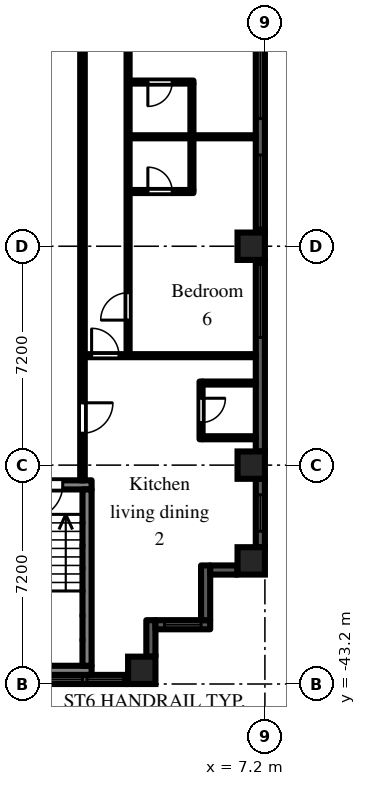
"""IFC4 building model, lengths in metres.
Left out: names, types, materials, properties, quantities, classifications, styles, units other than length and angle.
Written with IfcOpenShell. Run it as: python <this file> out.ifc"""

import sys

from ifc_helpers import new_model, si_unit, direction, frame, frame_2d, origin, origin_2d, place, context, subcontext, project, spatial, rectangle, extrude, element, fill, save


model = new_model("IFC4")
c1 = context("Model", 3, precision=1e-05, world=origin(), true_north=direction((0.0, 1.0)))
c2 = subcontext(c1, "Body", "Model", "MODEL_VIEW")
j1 = project(units=[si_unit("LENGTHUNIT", "METRE"), si_unit("PLANEANGLEUNIT", "RADIAN")], contexts=[c1])
p1 = place(None, origin())
s1 = spatial("IfcSite", under=j1, at=p1, CompositionType="ELEMENT")
p2 = place(p1, origin())
s2 = spatial("IfcBuilding", under=s1, at=p2, CompositionType="ELEMENT")
p3 = place(p2, frame((0.0, 0.0, 59.7)))
s3 = spatial("IfcBuildingStorey", under=s2, at=p3, CompositionType="ELEMENT", Elevation=59.7)
for number, where, z_axis, x_axis in (
    (1, (3.15, -42.75, 0.0), (0.0, 0.0, 1.0), (1.0, 0.0, 0.0)),
    (2, (6.75, -39.15, 0.0), (0.0, 0.0, 1.0), (1.0, 0.0, 0.0)),
    (3, (6.75, -36.0, 0.0), (0.0, 0.0, 1.0), (1.0, 0.0, 0.0)),
    (4, (6.75, -28.8, 0.0), (0.0, 0.0, 1.0), (1.0, 0.0, 0.0)),
):
    element("IfcColumn", number, at=place(p3, frame(where, z_axis=z_axis, x_axis=x_axis)), inside=s3, PredefinedType="COLUMN", context=c2, shape_type="SweptSolid", body=[
        extrude(rectangle(XDim=0.9, YDim=0.9, at=origin_2d()), origin(), (0.0, 0.0, 1.0), 3.0),
    ])
p4 = place(p3, frame((-2.7, -43.05, 0.0), z_axis=(0.0, 0.0, 1.0), x_axis=(1.0, 0.0, 0.0)))
e5 = element("IfcWall", 5, at=p4, inside=s3, PredefinedType="SOLIDWALL", context=c2, shape_type="SweptSolid", body=[
    extrude(rectangle(XDim=5.4, YDim=0.3, at=frame_2d((2.7, 0.0))), origin(), (0.0, 0.0, 1.0), 2.1),
])
p5 = place(p4, frame((1.5, 0.0, 0.2)))
e6 = element("IfcOpeningElement", 6, at=p5, cuts=e5, PredefinedType="OPENING", context=c2, shape_type="SweptSolid", body=[
    extrude(rectangle(XDim=2.4, YDim=1.85, at=frame_2d((1.2, 0.925))), frame((0.0, 0.16, 0.0), z_axis=(0.0, -1.0, 0.0), x_axis=(1.0, 0.0, 0.0)), (0.0, 0.0, 1.0), 0.32),
])
p6 = place(p4, frame((0.15, 0.0, 0.2)))
e7 = element("IfcOpeningElement", 7, at=p6, cuts=e5, PredefinedType="OPENING", context=c2, shape_type="SweptSolid", body=[
    extrude(rectangle(XDim=1.2, YDim=1.85, at=frame_2d((0.6, 0.925))), frame((0.0, 0.16, 0.0), z_axis=(0.0, -1.0, 0.0), x_axis=(1.0, 0.0, 0.0)), (0.0, 0.0, 1.0), 0.32),
])
p7 = place(p4, frame((4.05, 0.0, 0.2)))
e8 = element("IfcOpeningElement", 8, at=p7, cuts=e5, PredefinedType="OPENING", context=c2, shape_type="SweptSolid", body=[
    extrude(rectangle(XDim=1.2, YDim=1.85, at=frame_2d((0.6, 0.925))), frame((0.0, 0.16, 0.0), z_axis=(0.0, -1.0, 0.0), x_axis=(1.0, 0.0, 0.0)), (0.0, 0.0, 1.0), 0.32),
])
p8 = place(p3, frame((3.45, -42.3, 0.0), z_axis=(0.0, 0.0, 1.0), x_axis=(0.0, 1.0, 0.0)))
e9 = element("IfcWall", 9, at=p8, inside=s3, PredefinedType="SOLIDWALL", context=c2, shape_type="SweptSolid", body=[
    extrude(rectangle(XDim=1.2, YDim=0.3, at=frame_2d((0.6, 0.0))), origin(), (0.0, 0.0, 1.0), 2.55),
])
p9 = place(p3, frame((3.6, -41.25, 0.0), z_axis=(0.0, 0.0, 1.0), x_axis=(1.0, 0.0, 0.0)))
e10 = element("IfcWall", 10, at=p9, inside=s3, PredefinedType="SOLIDWALL", context=c2, shape_type="SweptSolid", body=[
    extrude(rectangle(XDim=1.8, YDim=0.3, at=frame_2d((0.9, 0.0))), origin(), (0.0, 0.0, 1.0), 2.55),
])
p10 = place(p9, frame((0.3, 0.0, 0.2)))
e11 = element("IfcOpeningElement", 11, at=p10, cuts=e10, PredefinedType="OPENING", context=c2, shape_type="SweptSolid", body=[
    extrude(rectangle(XDim=1.2, YDim=1.85, at=frame_2d((0.6, 0.925))), frame((0.0, 0.16, 0.0), z_axis=(0.0, -1.0, 0.0), x_axis=(1.0, 0.0, 0.0)), (0.0, 0.0, 1.0), 0.32),
])
p11 = place(p3, frame((5.25, -41.1, 0.0), z_axis=(0.0, 0.0, 1.0), x_axis=(0.0, 1.0, 0.0)))
e12 = element("IfcWall", 12, at=p11, inside=s3, PredefinedType="SOLIDWALL", context=c2, shape_type="SweptSolid", body=[
    extrude(rectangle(XDim=1.8, YDim=0.3, at=frame_2d((0.9, 0.0))), origin(), (0.0, 0.0, 1.0), 2.55),
])
p12 = place(p3, frame((5.4, -39.45, 0.0), z_axis=(0.0, 0.0, 1.0), x_axis=(1.0, 0.0, 0.0)))
e13 = element("IfcWall", 13, at=p12, inside=s3, PredefinedType="SOLIDWALL", context=c2, shape_type="SweptSolid", body=[
    extrude(rectangle(XDim=0.9, YDim=0.3, at=frame_2d((0.45, 0.0))), origin(), (0.0, 0.0, 1.0), 2.55),
])
p13 = place(p3, frame((7.05, -38.7, 0.0), z_axis=(0.0, 0.0, 1.0), x_axis=(0.0, 1.0, 0.0)))
e14 = element("IfcWall", 14, at=p13, inside=s3, PredefinedType="SOLIDWALL", context=c2, shape_type="SweptSolid", body=[
    extrude(rectangle(XDim=2.25, YDim=0.3, at=frame_2d((1.125, 0.0))), origin(), (0.0, 0.0, 1.0), 2.1),
])
p14 = place(p13, frame((0.525, 0.0, 0.2)))
e15 = element("IfcOpeningElement", 15, at=p14, cuts=e14, PredefinedType="OPENING", context=c2, shape_type="SweptSolid", body=[
    extrude(rectangle(XDim=1.2, YDim=1.85, at=frame_2d((0.6, 0.925))), frame((0.0, 0.16, 0.0), z_axis=(0.0, -1.0, 0.0), x_axis=(1.0, 0.0, 0.0)), (0.0, 0.0, 1.0), 0.32),
])
p15 = place(p3, frame((7.05, -35.55, 0.0), z_axis=(0.0, 0.0, 1.0), x_axis=(0.0, 1.0, 0.0)))
e16 = element("IfcWall", 16, at=p15, inside=s3, PredefinedType="SOLIDWALL", context=c2, shape_type="SweptSolid", body=[
    extrude(rectangle(XDim=6.3, YDim=0.3, at=frame_2d((3.15, 0.0))), origin(), (0.0, 0.0, 1.0), 2.1),
])
p16 = place(p15, frame((3.75, 0.0, 0.2)))
e17 = element("IfcOpeningElement", 17, at=p16, cuts=e16, PredefinedType="OPENING", context=c2, shape_type="SweptSolid", body=[
    extrude(rectangle(XDim=2.4, YDim=1.85, at=frame_2d((1.2, 0.925))), frame((0.0, 0.16, 0.0), z_axis=(0.0, -1.0, 0.0), x_axis=(1.0, 0.0, 0.0)), (0.0, 0.0, 1.0), 0.32),
])
p17 = place(p3, frame((7.05, -28.35, 0.0), z_axis=(0.0, 0.0, 1.0), x_axis=(0.0, 1.0, 0.0)))
e18 = element("IfcWall", 18, at=p17, inside=s3, PredefinedType="SOLIDWALL", context=c2, shape_type="SweptSolid", body=[
    extrude(rectangle(XDim=6.3, YDim=0.3, at=frame_2d((3.15, 0.0))), origin(), (0.0, 0.0, 1.0), 2.1),
])
p18 = place(p17, frame((0.15, 0.0, 0.2)))
e19 = element("IfcOpeningElement", 19, at=p18, cuts=e18, PredefinedType="OPENING", context=c2, shape_type="SweptSolid", body=[
    extrude(rectangle(XDim=2.4, YDim=1.85, at=frame_2d((1.2, 0.925))), frame((0.0, 0.16, 0.0), z_axis=(0.0, -1.0, 0.0), x_axis=(1.0, 0.0, 0.0)), (0.0, 0.0, 1.0), 0.32),
])
p19 = place(p17, frame((3.75, 0.0, 0.2)))
e20 = element("IfcOpeningElement", 20, at=p19, cuts=e18, PredefinedType="OPENING", context=c2, shape_type="SweptSolid", body=[
    extrude(rectangle(XDim=2.4, YDim=1.85, at=frame_2d((1.2, 0.925))), frame((0.0, 0.16, 0.0), z_axis=(0.0, -1.0, 0.0), x_axis=(1.0, 0.0, 0.0)), (0.0, 0.0, 1.0), 0.32),
])
p20 = place(p3, frame((-1.5, -36.65, 0.0), z_axis=(0.0, 0.0, 1.0), x_axis=(1.0, 0.0, 0.0)))
e21 = element("IfcWall", 21, at=p20, inside=s3, PredefinedType="SHEAR", context=c2, shape_type="SweptSolid", body=[
    extrude(rectangle(XDim=3.0, YDim=0.3, at=frame_2d((1.5, 0.0))), origin(), (0.0, 0.0, 1.0), 2.55),
])
p21 = place(p20, frame((0.95, 0.0, 0.0)))
e22 = element("IfcOpeningElement", 22, at=p21, cuts=e21, PredefinedType="OPENING", context=c2, shape_type="SweptSolid", body=[
    extrude(rectangle(XDim=1.1, YDim=2.1, at=frame_2d((0.55, 1.05))), frame((0.0, 0.16, 0.0), z_axis=(0.0, -1.0, 0.0), x_axis=(1.0, 0.0, 0.0)), (0.0, 0.0, 1.0), 0.32),
])
p22 = place(p3, frame((-1.5, -42.75, 0.0), z_axis=(0.0, 0.0, 1.0), x_axis=(1.0, 0.0, 0.0)))
e23 = element("IfcWall", 23, at=p22, inside=s3, PredefinedType="SHEAR", context=c2, shape_type="SweptSolid", body=[
    extrude(rectangle(XDim=3.0, YDim=0.3, at=frame_2d((1.5, 0.0))), origin(), (0.0, 0.0, 1.0), 2.55),
])
p23 = place(p3, frame((1.35, -36.8, 0.0), z_axis=(0.0, 0.0, 1.0), x_axis=(0.0, -1.0, 0.0)))
e24 = element("IfcWall", 24, at=p23, inside=s3, PredefinedType="SHEAR", context=c2, shape_type="SweptSolid", body=[
    extrude(rectangle(XDim=5.8, YDim=0.3, at=frame_2d((2.9, 0.0))), origin(), (0.0, 0.0, 1.0), 2.55),
])
p24 = place(p3, frame((1.2, -36.5, 0.0), z_axis=(0.0, 0.0, 1.0), x_axis=(0.0, 1.0, 0.0)))
e25 = element("IfcWall", 25, at=p24, inside=s3, PredefinedType="PARTITIONING", context=c2, shape_type="SweptSolid", body=[
    extrude(rectangle(XDim=35.375, YDim=0.15, at=frame_2d((17.688, 0.0))), origin(), (0.0, 0.0, 1.0), 2.55),
])
p25 = place(p24, frame((33.65, 0.0, 0.0)))
e26 = element("IfcOpeningElement", 26, at=p25, cuts=e25, PredefinedType="OPENING", context=c2, shape_type="SweptSolid", body=[
    extrude(rectangle(XDim=0.9, YDim=2.1, at=frame_2d((0.45, 1.05))), frame((0.0, 0.085, 0.0), z_axis=(0.0, -1.0, 0.0), x_axis=(1.0, 0.0, 0.0)), (0.0, 0.0, 1.0), 0.17),
])
p26 = place(p24, frame((30.65, 0.0, 0.0)))
e27 = element("IfcOpeningElement", 27, at=p26, cuts=e25, PredefinedType="OPENING", context=c2, shape_type="SweptSolid", body=[
    extrude(rectangle(XDim=0.9, YDim=2.1, at=frame_2d((0.45, 1.05))), frame((0.0, 0.085, 0.0), z_axis=(0.0, -1.0, 0.0), x_axis=(1.0, 0.0, 0.0)), (0.0, 0.0, 1.0), 0.17),
])
p27 = place(p24, frame((27.45, 0.0, 0.0)))
e28 = element("IfcOpeningElement", 28, at=p27, cuts=e25, PredefinedType="OPENING", context=c2, shape_type="SweptSolid", body=[
    extrude(rectangle(XDim=0.9, YDim=2.1, at=frame_2d((0.45, 1.05))), frame((0.0, 0.085, 0.0), z_axis=(0.0, -1.0, 0.0), x_axis=(1.0, 0.0, 0.0)), (0.0, 0.0, 1.0), 0.17),
])
p28 = place(p24, frame((23.85, 0.0, 0.0)))
e29 = element("IfcOpeningElement", 29, at=p28, cuts=e25, PredefinedType="OPENING", context=c2, shape_type="SweptSolid", body=[
    extrude(rectangle(XDim=0.9, YDim=2.1, at=frame_2d((0.45, 1.05))), frame((0.0, 0.085, 0.0), z_axis=(0.0, -1.0, 0.0), x_axis=(1.0, 0.0, 0.0)), (0.0, 0.0, 1.0), 0.17),
])
p29 = place(p24, frame((20.75, 0.0, 0.0)))
e30 = element("IfcOpeningElement", 30, at=p29, cuts=e25, PredefinedType="OPENING", context=c2, shape_type="SweptSolid", body=[
    extrude(rectangle(XDim=0.9, YDim=2.1, at=frame_2d((0.45, 1.05))), frame((0.0, 0.085, 0.0), z_axis=(0.0, -1.0, 0.0), x_axis=(1.0, 0.0, 0.0)), (0.0, 0.0, 1.0), 0.17),
])
p30 = place(p24, frame((18.95, 0.0, 0.0)))
e31 = element("IfcOpeningElement", 31, at=p30, cuts=e25, PredefinedType="OPENING", context=c2, shape_type="SweptSolid", body=[
    extrude(rectangle(XDim=0.9, YDim=2.1, at=frame_2d((0.45, 1.05))), frame((0.0, 0.085, 0.0), z_axis=(0.0, -1.0, 0.0), x_axis=(1.0, 0.0, 0.0)), (0.0, 0.0, 1.0), 0.17),
])
p31 = place(p24, frame((1.55, 0.0, 0.0)))
e32 = element("IfcOpeningElement", 32, at=p31, cuts=e25, PredefinedType="OPENING", context=c2, shape_type="SweptSolid", body=[
    extrude(rectangle(XDim=1.0, YDim=2.1, at=frame_2d((0.5, 1.05))), frame((0.0, 0.085, 0.0), z_axis=(0.0, -1.0, 0.0), x_axis=(1.0, 0.0, 0.0)), (0.0, 0.0, 1.0), 0.17),
])
p32 = place(p3, frame((1.275, -32.4, 0.0), z_axis=(0.0, 0.0, 1.0), x_axis=(1.0, 0.0, 0.0)))
e33 = element("IfcWall", 33, at=p32, inside=s3, PredefinedType="PARTITIONING", context=c2, shape_type="SweptSolid", body=[
    extrude(rectangle(XDim=5.625, YDim=0.1, at=frame_2d((2.812, 0.0))), origin(), (0.0, 0.0, 1.0), 2.55),
])
p33 = place(p32, frame((0.225, 0.0, 0.0)))
e34 = element("IfcOpeningElement", 34, at=p33, cuts=e33, PredefinedType="OPENING", context=c2, shape_type="SweptSolid", body=[
    extrude(rectangle(XDim=0.9, YDim=2.1, at=frame_2d((0.45, 1.05))), frame((0.0, 0.06, 0.0), z_axis=(0.0, -1.0, 0.0), x_axis=(1.0, 0.0, 0.0)), (0.0, 0.0, 1.0), 0.12),
])
p34 = place(p3, frame((2.7, -32.35, 0.0), z_axis=(0.0, 0.0, 1.0), x_axis=(0.0, 1.0, 0.0)))
e35 = element("IfcWall", 35, at=p34, inside=s3, PredefinedType="PARTITIONING", context=c2, shape_type="SweptSolid", body=[
    extrude(rectangle(XDim=14.275, YDim=0.1, at=frame_2d((7.138, 0.0))), origin(), (0.0, 0.0, 1.0), 2.55),
])
p35 = place(p34, frame((1.12, 0.0, 0.0)))
e36 = element("IfcOpeningElement", 36, at=p35, cuts=e35, PredefinedType="OPENING", context=c2, shape_type="SweptSolid", body=[
    extrude(rectangle(XDim=0.9, YDim=2.1, at=frame_2d((0.45, 1.05))), frame((0.0, 0.06, 0.0), z_axis=(0.0, -1.0, 0.0), x_axis=(1.0, 0.0, 0.0)), (0.0, 0.0, 1.0), 0.12),
])
p36 = place(p34, frame((12.28, 0.0, 0.0)))
e37 = element("IfcOpeningElement", 37, at=p36, cuts=e35, PredefinedType="OPENING", context=c2, shape_type="SweptSolid", body=[
    extrude(rectangle(XDim=0.9, YDim=2.1, at=frame_2d((0.45, 1.05))), frame((0.0, 0.06, 0.0), z_axis=(0.0, -1.0, 0.0), x_axis=(1.0, 0.0, 0.0)), (0.0, 0.0, 1.0), 0.12),
])
p37 = place(p3, frame((2.75, -27.0, 0.0), z_axis=(0.0, 0.0, 1.0), x_axis=(1.0, 0.0, 0.0)))
e38 = element("IfcWall", 38, at=p37, inside=s3, PredefinedType="PARTITIONING", context=c2, shape_type="SweptSolid", body=[
    extrude(rectangle(XDim=2.1, YDim=0.1, at=frame_2d((1.05, 0.0))), origin(), (0.0, 0.0, 1.0), 2.55),
])
p38 = place(p37, frame((0.6, 0.0, 0.0)))
e39 = element("IfcOpeningElement", 39, at=p38, cuts=e38, PredefinedType="OPENING", context=c2, shape_type="SweptSolid", body=[
    extrude(rectangle(XDim=0.8, YDim=2.1, at=frame_2d((0.4, 1.05))), frame((0.0, 0.06, 0.0), z_axis=(0.0, -1.0, 0.0), x_axis=(1.0, 0.0, 0.0)), (0.0, 0.0, 1.0), 0.12),
])
p39 = place(p3, frame((2.75, -25.2, 0.0), z_axis=(0.0, 0.0, 1.0), x_axis=(1.0, 0.0, 0.0)))
e40 = element("IfcWall", 40, at=p39, inside=s3, PredefinedType="PARTITIONING", context=c2, shape_type="SweptSolid", body=[
    extrude(rectangle(XDim=4.15, YDim=0.1, at=frame_2d((2.075, 0.0))), origin(), (0.0, 0.0, 1.0), 2.55),
])
p40 = place(p3, frame((2.75, -23.4, 0.0), z_axis=(0.0, 0.0, 1.0), x_axis=(1.0, 0.0, 0.0)))
e41 = element("IfcWall", 41, at=p40, inside=s3, PredefinedType="PARTITIONING", context=c2, shape_type="SweptSolid", body=[
    extrude(rectangle(XDim=2.1, YDim=0.1, at=frame_2d((1.05, 0.0))), origin(), (0.0, 0.0, 1.0), 2.55),
])
p41 = place(p40, frame((0.6, 0.0, 0.0)))
e42 = element("IfcOpeningElement", 42, at=p41, cuts=e41, PredefinedType="OPENING", context=c2, shape_type="SweptSolid", body=[
    extrude(rectangle(XDim=0.8, YDim=2.1, at=frame_2d((0.4, 1.05))), frame((0.0, 0.06, 0.0), z_axis=(0.0, -1.0, 0.0), x_axis=(1.0, 0.0, 0.0)), (0.0, 0.0, 1.0), 0.12),
])
p42 = place(p3, frame((4.8, -26.95, 0.0), z_axis=(0.0, 0.0, 1.0), x_axis=(0.0, 1.0, 0.0)))
e43 = element("IfcWall", 43, at=p42, inside=s3, PredefinedType="PARTITIONING", context=c2, shape_type="SweptSolid", body=[
    extrude(rectangle(XDim=3.5, YDim=0.1, at=frame_2d((1.75, 0.0))), origin(), (0.0, 0.0, 1.0), 2.55),
])
p43 = place(p3, frame((5.1, -35.15, 0.0), z_axis=(0.0, 0.0, 1.0), x_axis=(0.0, 1.0, 0.0)))
e44 = element("IfcWall", 44, at=p43, inside=s3, PredefinedType="PARTITIONING", context=c2, shape_type="SweptSolid", body=[
    extrude(rectangle(XDim=1.9, YDim=0.1, at=frame_2d((0.95, 0.0))), origin(), (0.0, 0.0, 1.0), 2.55),
])
p44 = place(p43, frame((0.55, 0.0, 0.0)))
e45 = element("IfcOpeningElement", 45, at=p44, cuts=e44, PredefinedType="OPENING", context=c2, shape_type="SweptSolid", body=[
    extrude(rectangle(XDim=0.8, YDim=2.1, at=frame_2d((0.4, 1.05))), frame((0.0, 0.06, 0.0), z_axis=(0.0, -1.0, 0.0), x_axis=(1.0, 0.0, 0.0)), (0.0, 0.0, 1.0), 0.12),
])
for number, where, z_axis, x_axis in (
    (46, (5.15, -35.1, 0.0), (0.0, 0.0, 1.0), (1.0, 0.0, 0.0)),
    (47, (5.15, -33.3, 0.0), (0.0, 0.0, 1.0), (1.0, 0.0, 0.0)),
):
    element("IfcWall", number, at=place(p3, frame(where, z_axis=z_axis, x_axis=x_axis)), inside=s3, PredefinedType="PARTITIONING", context=c2, shape_type="SweptSolid", body=[
        extrude(rectangle(XDim=1.75, YDim=0.1, at=frame_2d((0.875, 0.0))), origin(), (0.0, 0.0, 1.0), 2.55),
    ])
p45 = place(p5, origin())
e48 = element("IfcWindow", 48, at=p45, inside=s3, PartitioningType="SINGLE_PANEL", PredefinedType="WINDOW", context=c2, shape_type="SweptSolid", body=[
    extrude(rectangle(XDim=2.4, YDim=1.85, at=frame_2d((1.2, 0.925))), frame((0.0, 0.03, 0.0), z_axis=(0.0, -1.0, 0.0), x_axis=(1.0, 0.0, 0.0)), (0.0, 0.0, 1.0), 0.06),
])
fill(e6, e48)
p46 = place(p7, origin())
e49 = element("IfcWindow", 49, at=p46, inside=s3, PartitioningType="SINGLE_PANEL", PredefinedType="WINDOW", context=c2, shape_type="SweptSolid", body=[
    extrude(rectangle(XDim=1.2, YDim=1.85, at=frame_2d((0.6, 0.925))), frame((0.0, 0.03, 0.0), z_axis=(0.0, -1.0, 0.0), x_axis=(1.0, 0.0, 0.0)), (0.0, 0.0, 1.0), 0.06),
])
fill(e8, e49)
p47 = place(p10, origin())
e50 = element("IfcWindow", 50, at=p47, inside=s3, PartitioningType="SINGLE_PANEL", PredefinedType="WINDOW", context=c2, shape_type="SweptSolid", body=[
    extrude(rectangle(XDim=1.2, YDim=1.85, at=frame_2d((0.6, 0.925))), frame((0.0, 0.03, 0.0), z_axis=(0.0, -1.0, 0.0), x_axis=(1.0, 0.0, 0.0)), (0.0, 0.0, 1.0), 0.06),
])
fill(e11, e50)
p48 = place(p14, origin())
e51 = element("IfcWindow", 51, at=p48, inside=s3, PartitioningType="SINGLE_PANEL", PredefinedType="WINDOW", context=c2, shape_type="SweptSolid", body=[
    extrude(rectangle(XDim=1.2, YDim=1.85, at=frame_2d((0.6, 0.925))), frame((0.0, 0.03, 0.0), z_axis=(0.0, -1.0, 0.0), x_axis=(1.0, 0.0, 0.0)), (0.0, 0.0, 1.0), 0.06),
])
fill(e15, e51)
p49 = place(p16, origin())
e52 = element("IfcWindow", 52, at=p49, inside=s3, PartitioningType="SINGLE_PANEL", PredefinedType="WINDOW", context=c2, shape_type="SweptSolid", body=[
    extrude(rectangle(XDim=2.4, YDim=1.85, at=frame_2d((1.2, 0.925))), frame((0.0, 0.03, 0.0), z_axis=(0.0, -1.0, 0.0), x_axis=(1.0, 0.0, 0.0)), (0.0, 0.0, 1.0), 0.06),
])
fill(e17, e52)
p50 = place(p18, origin())
e53 = element("IfcWindow", 53, at=p50, inside=s3, PartitioningType="SINGLE_PANEL", PredefinedType="WINDOW", context=c2, shape_type="SweptSolid", body=[
    extrude(rectangle(XDim=2.4, YDim=1.85, at=frame_2d((1.2, 0.925))), frame((0.0, 0.03, 0.0), z_axis=(0.0, -1.0, 0.0), x_axis=(1.0, 0.0, 0.0)), (0.0, 0.0, 1.0), 0.06),
])
fill(e19, e53)
p51 = place(p19, origin())
e54 = element("IfcWindow", 54, at=p51, inside=s3, PartitioningType="SINGLE_PANEL", PredefinedType="WINDOW", context=c2, shape_type="SweptSolid", body=[
    extrude(rectangle(XDim=2.4, YDim=1.85, at=frame_2d((1.2, 0.925))), frame((0.0, 0.03, 0.0), z_axis=(0.0, -1.0, 0.0), x_axis=(1.0, 0.0, 0.0)), (0.0, 0.0, 1.0), 0.06),
])
fill(e20, e54)
p52 = place(p21, frame((1.1, 0.0, 0.0), z_axis=(0.0, 0.0, 1.0), x_axis=(-1.0, 0.0, 0.0)))
e55 = element("IfcDoor", 55, at=p52, inside=s3, OperationType="SINGLE_SWING_RIGHT", PredefinedType="DOOR", context=c2, shape_type="SweptSolid", body=[
    extrude(rectangle(XDim=1.1, YDim=2.1, at=frame_2d((0.55, 1.05))), frame((0.0, 0.025, 0.0), z_axis=(0.0, -1.0, 0.0), x_axis=(1.0, 0.0, 0.0)), (0.0, 0.0, 1.0), 0.05),
])
fill(e22, e55)
p53 = place(p44, frame((0.8, 0.0, 0.0), z_axis=(0.0, 0.0, 1.0), x_axis=(-1.0, 0.0, 0.0)))
e56 = element("IfcDoor", 56, at=p53, inside=s3, OperationType="SINGLE_SWING_LEFT", PredefinedType="DOOR", context=c2, shape_type="SweptSolid", body=[
    extrude(rectangle(XDim=0.8, YDim=2.1, at=frame_2d((0.4, 1.05))), frame((0.0, 0.025, 0.0), z_axis=(0.0, -1.0, 0.0), x_axis=(1.0, 0.0, 0.0)), (0.0, 0.0, 1.0), 0.05),
])
fill(e45, e56)
p54 = place(p31, frame((1.0, 0.0, 0.0), z_axis=(0.0, 0.0, 1.0), x_axis=(-1.0, 0.0, 0.0)))
e57 = element("IfcDoor", 57, at=p54, inside=s3, OperationType="SINGLE_SWING_LEFT", PredefinedType="DOOR", context=c2, shape_type="SweptSolid", body=[
    extrude(rectangle(XDim=1.0, YDim=2.1, at=frame_2d((0.5, 1.05))), frame((0.0, 0.025, 0.0), z_axis=(0.0, -1.0, 0.0), x_axis=(1.0, 0.0, 0.0)), (0.0, 0.0, 1.0), 0.05),
])
fill(e32, e57)
p55 = place(p33, origin())
e58 = element("IfcDoor", 58, at=p55, inside=s3, OperationType="SINGLE_SWING_LEFT", PredefinedType="DOOR", context=c2, shape_type="SweptSolid", body=[
    extrude(rectangle(XDim=0.9, YDim=2.1, at=frame_2d((0.45, 1.05))), frame((0.0, 0.025, 0.0), z_axis=(0.0, -1.0, 0.0), x_axis=(1.0, 0.0, 0.0)), (0.0, 0.0, 1.0), 0.05),
])
fill(e34, e58)
p56 = place(p35, origin())
e59 = element("IfcDoor", 59, at=p56, inside=s3, OperationType="SINGLE_SWING_LEFT", PredefinedType="DOOR", context=c2, shape_type="SweptSolid", body=[
    extrude(rectangle(XDim=0.9, YDim=2.1, at=frame_2d((0.45, 1.05))), frame((0.0, 0.025, 0.0), z_axis=(0.0, -1.0, 0.0), x_axis=(1.0, 0.0, 0.0)), (0.0, 0.0, 1.0), 0.05),
])
fill(e36, e59)
p57 = place(p41, frame((0.8, 0.0, 0.0), z_axis=(0.0, 0.0, 1.0), x_axis=(-1.0, 0.0, 0.0)))
e60 = element("IfcDoor", 60, at=p57, inside=s3, OperationType="SINGLE_SWING_RIGHT", PredefinedType="DOOR", context=c2, shape_type="SweptSolid", body=[
    extrude(rectangle(XDim=0.8, YDim=2.1, at=frame_2d((0.4, 1.05))), frame((0.0, 0.025, 0.0), z_axis=(0.0, -1.0, 0.0), x_axis=(1.0, 0.0, 0.0)), (0.0, 0.0, 1.0), 0.05),
])
fill(e42, e60)
p58 = place(p38, origin())
e61 = element("IfcDoor", 61, at=p58, inside=s3, OperationType="SINGLE_SWING_LEFT", PredefinedType="DOOR", context=c2, shape_type="SweptSolid", body=[
    extrude(rectangle(XDim=0.8, YDim=2.1, at=frame_2d((0.4, 1.05))), frame((0.0, 0.025, 0.0), z_axis=(0.0, -1.0, 0.0), x_axis=(1.0, 0.0, 0.0)), (0.0, 0.0, 1.0), 0.05),
])
fill(e39, e61)
save(model, sys.argv[1])
